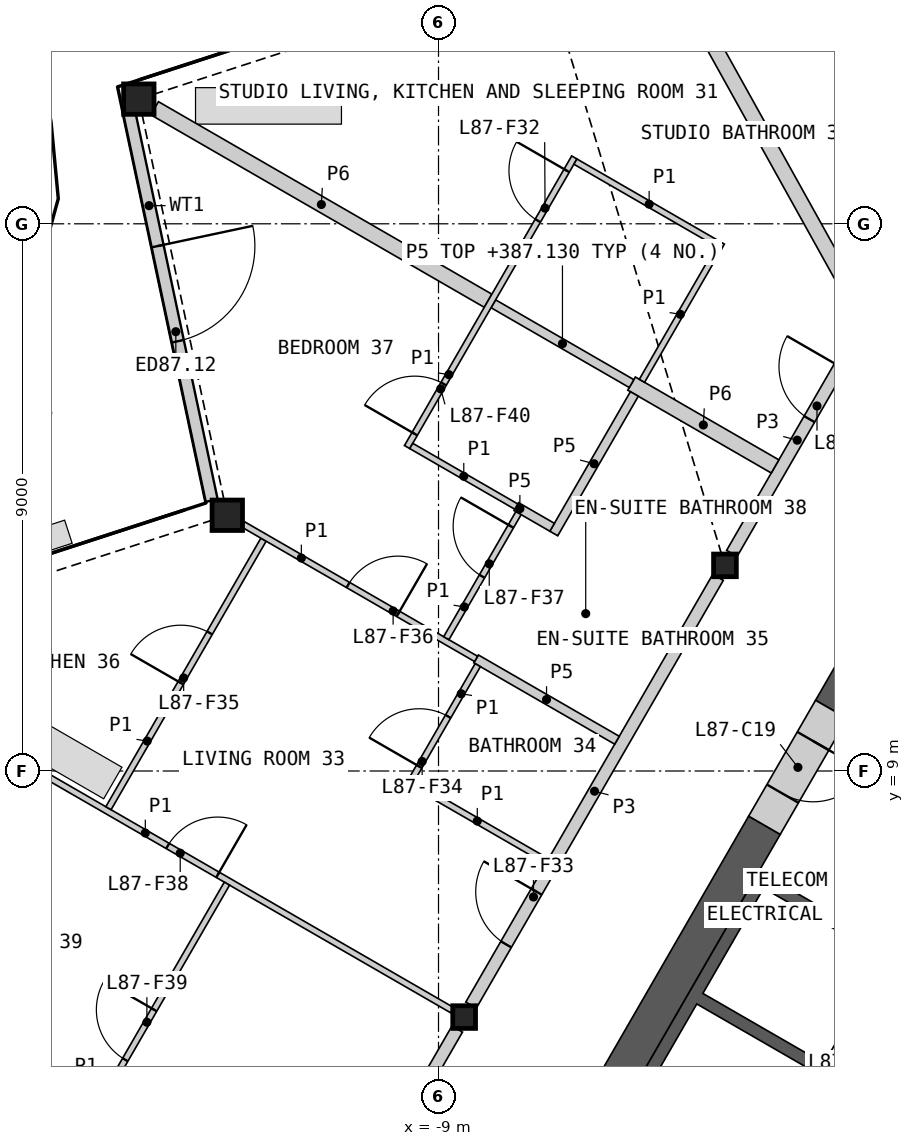
"""IFC4 building model, lengths in metres.
Left out: names, types, materials, properties, quantities, classifications, styles, units other than length and angle.
Written with IfcOpenShell. Run it as: python <this file> out.ifc"""

import sys

from ifc_helpers import new_model, si_unit, direction, frame, frame_2d, origin, origin_2d, place, context, subcontext, project, spatial, polyline, rectangle, hollow_rectangle, i_section, outline, extrude, element, fill, save


model = new_model("IFC4")
c1 = context("Model", 3, precision=1e-05, world=origin(), true_north=direction((0.0, 1.0)))
c2 = subcontext(c1, "Body", "Model", "MODEL_VIEW")
j1 = project(units=[si_unit("LENGTHUNIT", "METRE"), si_unit("PLANEANGLEUNIT", "RADIAN")], contexts=[c1])
p1 = place(None, origin())
s1 = spatial("IfcSite", under=j1, at=p1, CompositionType="ELEMENT")
p2 = place(p1, origin())
s2 = spatial("IfcBuilding", under=s1, at=p2, CompositionType="ELEMENT")
p3 = place(p2, frame((0.0, 0.0, 384.8)))
s3 = spatial("IfcBuildingStorey", under=s2, at=p3, CompositionType="ELEMENT", Elevation=384.8)
for number, where, z_axis, x_axis in (
    (1, (-13.929, 20.051, 0.0), (0.0, 0.0, 1.0), (1.0, 0.0, 0.0)),
    (2, (-12.474, 13.206, 0.0), (0.0, 0.0, 1.0), (1.0, 0.0, 0.0)),
):
    element("IfcColumn", number, at=place(p3, frame(where, z_axis=z_axis, x_axis=x_axis)), inside=s3, PredefinedType="COLUMN", context=c2, shape_type="SweptSolid", body=[
        extrude(hollow_rectangle(XDim=0.5, YDim=0.5, WallThickness=0.03, at=origin_2d()), origin(), (0.0, 0.0, 1.0), 3.4),
    ])
for number, where, z_axis, x_axis in (
    (3, (-4.289, 12.382, 0.0), (0.0, 0.0, 1.0), (1.0, 0.0, 0.0)),
    (4, (-8.578, 4.953, 0.0), (0.0, 0.0, 1.0), (1.0, 0.0, 0.0)),
):
    element("IfcColumn", number, at=place(p3, frame(where, z_axis=z_axis, x_axis=x_axis)), inside=s3, PredefinedType="COLUMN", context=c2, shape_type="SweptSolid", body=[
        extrude(i_section(OverallWidth=0.374, OverallDepth=0.372, WebThickness=0.016, FlangeThickness=0.026, at=origin_2d()), origin(), (0.0, 0.0, 1.0), 3.4),
    ])
p4 = place(p3, frame((-14.104, 19.915, 0.0), z_axis=(0.0, 0.0, 1.0), x_axis=(0.207924998532, -0.978144771997, 0.0)))
e5 = element("IfcWall", 5, at=p4, inside=s3, PredefinedType="SOLIDWALL", context=c2, shape_type="SweptSolid", body=[
    extrude(rectangle(XDim=6.612, YDim=0.2, at=frame_2d((3.306, 0.0))), origin(), (0.0, 0.0, 1.0), 2.634),
])
p5 = place(p4, frame((2.333, 0.0, 0.0)))
e6 = element("IfcOpeningElement", 6, at=p5, cuts=e5, PredefinedType="OPENING", context=c2, shape_type="SweptSolid", body=[
    extrude(rectangle(XDim=1.6, YDim=2.25, at=frame_2d((0.8, 1.125))), frame((0.0, 0.11, 0.0), z_axis=(0.0, -1.0, 0.0), x_axis=(1.0, 0.0, 0.0)), (0.0, 0.0, 1.0), 0.22),
])
p6 = place(p3, origin())
e7 = element("IfcWall", 7, at=p6, inside=s3, PredefinedType="SHEAR", context=c2, shape_type="SweptSolid", body=[
    extrude(outline(polyline([(-4.96, 0.208), (-7.131, 1.461), (-3.731, 7.35), (-1.561, 6.097), (-1.66, 5.924), (-3.652, 7.074), (-4.652, 5.342), (-2.66, 4.192), (-2.76, 4.019), (-4.752, 5.169), (-6.852, 1.531), (-4.861, 0.381), (-4.96, 0.208)])), origin(), (0.0, 0.0, 1.0), 3.1),
])
p7 = place(p3, frame((-1.631, 5.776, 0.0), z_axis=(0.0, 0.0, 1.0), x_axis=(-0.499992876559, -0.866029516466, 0.0)))
e8 = element("IfcWall", 8, at=p7, inside=s3, PredefinedType="SOLIDWALL", context=c2, shape_type="SweptSolid", body=[
    extrude(rectangle(XDim=6.486, YDim=0.2, at=frame_2d((3.243, 0.0))), origin(), (0.0, 0.0, 1.0), 3.1),
])
p8 = place(p7, frame((0.437, 0.0, 0.0)))
e9 = element("IfcOpeningElement", 9, at=p8, cuts=e8, PredefinedType="OPENING", context=c2, shape_type="SweptSolid", body=[
    extrude(rectangle(XDim=0.9, YDim=2.1, at=frame_2d((0.45, 1.05))), frame((0.0, 0.11, 0.0), z_axis=(0.0, -1.0, 0.0), x_axis=(1.0, 0.0, 0.0)), (0.0, 0.0, 1.0), 0.22),
])
p9 = place(p7, frame((3.737, 0.0, 0.0)))
e10 = element("IfcOpeningElement", 10, at=p9, cuts=e8, PredefinedType="OPENING", context=c2, shape_type="SweptSolid", body=[
    extrude(rectangle(XDim=0.9, YDim=2.1, at=frame_2d((0.45, 1.05))), frame((0.0, 0.11, 0.0), z_axis=(0.0, -1.0, 0.0), x_axis=(1.0, 0.0, 0.0)), (0.0, 0.0, 1.0), 0.22),
])
p10 = place(p3, frame((-3.639, 8.107, 0.0), z_axis=(0.0, 0.0, 1.0), x_axis=(-0.49999180351, -0.866030135978, 0.0)))
e11 = element("IfcWall", 11, at=p10, inside=s3, PredefinedType="SHEAR", context=c2, shape_type="SweptSolid", body=[
    extrude(rectangle(XDim=7.401, YDim=0.6, at=frame_2d((3.701, 0.0))), origin(), (0.0, 0.0, 1.0), 3.1),
])
p11 = place(p3, frame((-0.26, 13.961, 0.0), z_axis=(0.0, 0.0, 1.0), x_axis=(-0.499980485389, -0.866036670257, 0.0)))
e12 = element("IfcWall", 12, at=p11, inside=s3, PredefinedType="SHEAR", context=c2, shape_type="SweptSolid", body=[
    extrude(rectangle(XDim=4.559, YDim=0.6, at=frame_2d((2.28, 0.0))), origin(), (0.0, 0.0, 1.0), 3.1),
])
p12 = place(p3, frame((-2.539, 10.013, 0.0), z_axis=(0.0, 0.0, 1.0), x_axis=(-0.50002983664, -0.866008176907, 0.0)))
e13 = element("IfcWall", 13, at=p12, inside=s3, PredefinedType="SHEAR", context=c2, shape_type="SweptSolid", body=[
    extrude(rectangle(XDim=2.2, YDim=0.6, at=frame_2d((1.1, 0.0))), origin(), (0.0, 0.0, 1.0), 3.1),
])
p13 = place(p12, frame((0.6, 0.0, 0.0)))
e14 = element("IfcOpeningElement", 14, at=p13, cuts=e13, PredefinedType="OPENING", context=c2, shape_type="SweptSolid", body=[
    extrude(rectangle(XDim=1.0, YDim=2.1, at=frame_2d((0.5, 1.05))), frame((0.0, 0.31, 0.0), z_axis=(0.0, -1.0, 0.0), x_axis=(1.0, 0.0, 0.0)), (0.0, 0.0, 1.0), 0.62),
])
p14 = place(p3, frame((-8.685, 28.499, 0.0), z_axis=(0.0, 0.0, 1.0), x_axis=(0.486017177904, -0.873949256412, 0.0)))
e15 = element("IfcWall", 15, at=p14, inside=s3, PredefinedType="PARTITIONING", context=c2, shape_type="SweptSolid", body=[
    extrude(rectangle(XDim=13.956, YDim=0.25, at=frame_2d((6.978, 0.0))), origin(), (0.0, 0.0, 1.0), 2.33),
])
p15 = place(p3, frame((-8.465, 5.15, 0.0), z_axis=(0.0, 0.0, 1.0), x_axis=(0.499992155518, 0.866029932751, 0.0)))
e16 = element("IfcWall", 16, at=p15, inside=s3, PredefinedType="PARTITIONING", context=c2, shape_type="SweptSolid", body=[
    extrude(rectangle(XDim=8.123, YDim=0.2, at=frame_2d((4.062, 0.0))), origin(), (0.0, 0.0, 1.0), 3.1),
])
p16 = place(p15, frame((1.153, 0.0, 0.0)))
e17 = element("IfcOpeningElement", 17, at=p16, cuts=e16, PredefinedType="OPENING", context=c2, shape_type="SweptSolid", body=[
    extrude(rectangle(XDim=1.0, YDim=2.1, at=frame_2d((0.5, 1.05))), frame((0.0, 0.11, 0.0), z_axis=(0.0, -1.0, 0.0), x_axis=(1.0, 0.0, 0.0)), (0.0, 0.0, 1.0), 0.22),
])
p17 = place(p3, frame((-12.754, -2.279, 0.0), z_axis=(0.0, 0.0, 1.0), x_axis=(0.500001682468, 0.866024432409, 0.0)))
e18 = element("IfcWall", 18, at=p17, inside=s3, PredefinedType="PARTITIONING", context=c2, shape_type="SweptSolid", body=[
    extrude(rectangle(XDim=8.124, YDim=0.2, at=frame_2d((4.062, 0.0))), origin(), (0.0, 0.0, 1.0), 3.1),
])
p18 = place(p17, frame((1.153, 0.0, 0.0)))
e19 = element("IfcOpeningElement", 19, at=p18, cuts=e18, PredefinedType="OPENING", context=c2, shape_type="SweptSolid", body=[
    extrude(rectangle(XDim=1.0, YDim=2.1, at=frame_2d((0.5, 1.05))), frame((0.0, 0.11, 0.0), z_axis=(0.0, -1.0, 0.0), x_axis=(1.0, 0.0, 0.0)), (0.0, 0.0, 1.0), 0.22),
])
p19 = place(p3, frame((-17.414, 4.049, 0.0), z_axis=(0.0, 0.0, 1.0), x_axis=(0.866033839264, -0.499985389037, 0.0)))
e20 = element("IfcWall", 20, at=p19, inside=s3, PredefinedType="PARTITIONING", context=c2, shape_type="SweptSolid", body=[
    extrude(rectangle(XDim=7.1, YDim=0.25, at=frame_2d((3.55, 0.0))), origin(), (0.0, 0.0, 1.0), 2.33),
])
p20 = place(p3, frame((-13.669, 19.9, 0.0), z_axis=(0.0, 0.0, 1.0), x_axis=(0.866032778651, -0.499987226139, 0.0)))
e21 = element("IfcWall", 21, at=p20, inside=s3, PredefinedType="PARTITIONING", context=c2, shape_type="SweptSolid", body=[
    extrude(rectangle(XDim=6.332, YDim=0.25, at=frame_2d((3.166, 0.0))), origin(), (0.0, 0.0, 1.0), 2.33),
])
p21 = place(p3, frame((-4.176, 12.579, 0.0), z_axis=(0.0, 0.0, 1.0), x_axis=(0.500004215162, 0.866022970146, 0.0)))
e22 = element("IfcWall", 22, at=p21, inside=s3, PredefinedType="PARTITIONING", context=c2, shape_type="SweptSolid", body=[
    extrude(rectangle(XDim=4.3, YDim=0.2, at=frame_2d((2.15, 0.0))), origin(), (0.0, 0.0, 1.0), 3.1),
])
p22 = place(p21, frame((2.55, 0.0, 0.0)))
e23 = element("IfcOpeningElement", 23, at=p22, cuts=e22, PredefinedType="OPENING", context=c2, shape_type="SweptSolid", body=[
    extrude(rectangle(XDim=1.0, YDim=2.1, at=frame_2d((0.5, 1.05))), frame((0.0, 0.11, 0.0), z_axis=(0.0, -1.0, 0.0), x_axis=(1.0, 0.0, 0.0)), (0.0, 0.0, 1.0), 0.22),
])
p23 = place(p3, frame((-5.825, 15.372, 0.0), z_axis=(0.0, 0.0, 1.0), x_axis=(0.866051307416, -0.49995513091, 0.0)))
e24 = element("IfcWall", 24, at=p23, inside=s3, PredefinedType="PARTITIONING", context=c2, shape_type="SweptSolid", body=[
    extrude(rectangle(XDim=2.725, YDim=0.25, at=frame_2d((1.362, 0.0))), origin(), (0.0, 0.0, 1.0), 2.33),
])
p24 = place(p3, frame((-8.098, 16.684, 0.0), z_axis=(0.0, 0.0, 1.0), x_axis=(0.866036909293, -0.499980071345, 0.0)))
e25 = element("IfcWall", 25, at=p24, inside=s3, PredefinedType="PLUMBINGWALL", context=c2, shape_type="SweptSolid", body=[
    extrude(rectangle(XDim=2.625, YDim=0.15, at=frame_2d((1.312, 0.0))), origin(), (0.0, 0.0, 1.0), 2.33),
])
p25 = place(p3, frame((-8.382, 10.844, 0.0), z_axis=(0.0, 0.0, 1.0), x_axis=(0.866021425885, -0.500006889861, 0.0)))
e26 = element("IfcWall", 26, at=p25, inside=s3, PredefinedType="PLUMBINGWALL", context=c2, shape_type="SweptSolid", body=[
    extrude(rectangle(XDim=2.675, YDim=0.15, at=frame_2d((1.337, 0.0))), origin(), (0.0, 0.0, 1.0), 2.33),
])
p26 = place(p3, frame((-7.104, 12.906, 0.0), z_axis=(0.0, 0.0, 1.0), x_axis=(0.499993606316, 0.866029095148, 0.0)))
e27 = element("IfcWall", 27, at=p26, inside=s3, PredefinedType="PLUMBINGWALL", context=c2, shape_type="SweptSolid", body=[
    extrude(rectangle(XDim=2.65, YDim=0.15, at=frame_2d((1.325, 0.0))), origin(), (0.0, 0.0, 1.0), 2.33),
])
p27 = place(p3, frame((-7.72, 13.349, 0.0), z_axis=(0.0, 0.0, 1.0), x_axis=(0.866113839764, -0.499846793097, 0.0)))
e28 = element("IfcWall", 28, at=p27, inside=s3, PredefinedType="PLUMBINGWALL", context=c2, shape_type="SweptSolid", body=[
    extrude(rectangle(XDim=0.68, YDim=0.15, at=frame_2d((0.34, 0.0))), origin(), (0.0, 0.0, 1.0), 2.33),
])
p28 = place(p3, frame((-18.869, 10.894, 0.0), z_axis=(0.0, 0.0, 1.0), x_axis=(0.866023724155, -0.500002909193, 0.0)))
e29 = element("IfcWall", 29, at=p28, inside=s3, PredefinedType="PARTITIONING", context=c2, shape_type="SweptSolid", body=[
    extrude(rectangle(XDim=11.655, YDim=0.1, at=frame_2d((5.827, 0.0))), origin(), (0.0, 0.0, 1.0), 2.33),
])
p29 = place(p28, frame((6.253, 0.0, 0.0)))
e30 = element("IfcOpeningElement", 30, at=p29, cuts=e29, PredefinedType="OPENING", context=c2, shape_type="SweptSolid", body=[
    extrude(rectangle(XDim=0.95, YDim=2.1, at=frame_2d((0.475, 1.05))), frame((0.0, 0.06, 0.0), z_axis=(0.0, -1.0, 0.0), x_axis=(1.0, 0.0, 0.0)), (0.0, 0.0, 1.0), 0.12),
])
p30 = place(p3, frame((-9.517, 14.328, 0.0), z_axis=(0.0, 0.0, 1.0), x_axis=(0.499996545922, 0.866027397988, 0.0)))
e31 = element("IfcWall", 31, at=p30, inside=s3, PredefinedType="PARTITIONING", context=c2, shape_type="SweptSolid", body=[
    extrude(rectangle(XDim=5.5, YDim=0.1, at=frame_2d((2.75, 0.0))), origin(), (0.0, 0.0, 1.0), 2.33),
])
p31 = place(p30, frame((4.3, 0.0, 0.0)))
e32 = element("IfcOpeningElement", 32, at=p31, cuts=e31, PredefinedType="OPENING", context=c2, shape_type="SweptSolid", body=[
    extrude(rectangle(XDim=0.95, YDim=2.1, at=frame_2d((0.475, 1.05))), frame((0.0, 0.06, 0.0), z_axis=(0.0, -1.0, 0.0), x_axis=(1.0, 0.0, 0.0)), (0.0, 0.0, 1.0), 0.12),
])
p32 = place(p30, frame((0.25, 0.0, 0.0)))
e33 = element("IfcOpeningElement", 33, at=p32, cuts=e31, PredefinedType="OPENING", context=c2, shape_type="SweptSolid", body=[
    extrude(rectangle(XDim=0.95, YDim=2.1, at=frame_2d((0.475, 1.05))), frame((0.0, 0.06, 0.0), z_axis=(0.0, -1.0, 0.0), x_axis=(1.0, 0.0, 0.0)), (0.0, 0.0, 1.0), 0.12),
])
p33 = place(p3, frame((-14.992, 2.796, 0.0), z_axis=(0.0, 0.0, 1.0), x_axis=(0.499990214365, 0.86603105345, 0.0)))
e34 = element("IfcWall", 34, at=p33, inside=s3, PredefinedType="PARTITIONING", context=c2, shape_type="SweptSolid", body=[
    extrude(rectangle(XDim=5.025, YDim=0.1, at=frame_2d((2.512, 0.0))), origin(), (0.0, 0.0, 1.0), 2.33),
])
p34 = place(p33, frame((1.68, 0.0, 0.0)))
e35 = element("IfcOpeningElement", 35, at=p34, cuts=e34, PredefinedType="OPENING", context=c2, shape_type="SweptSolid", body=[
    extrude(rectangle(XDim=0.95, YDim=2.1, at=frame_2d((0.475, 1.05))), frame((0.0, 0.06, 0.0), z_axis=(0.0, -1.0, 0.0), x_axis=(1.0, 0.0, 0.0)), (0.0, 0.0, 1.0), 0.12),
])
p35 = place(p3, frame((-14.428, 8.388, 0.0), z_axis=(0.0, 0.0, 1.0), x_axis=(0.500005610874, 0.86602216432, 0.0)))
e36 = element("IfcWall", 36, at=p35, inside=s3, PredefinedType="PARTITIONING", context=c2, shape_type="SweptSolid", body=[
    extrude(rectangle(XDim=5.1, YDim=0.1, at=frame_2d((2.55, 0.0))), origin(), (0.0, 0.0, 1.0), 2.33),
])
p36 = place(p35, frame((2.379, 0.0, 0.0)))
e37 = element("IfcOpeningElement", 37, at=p36, cuts=e36, PredefinedType="OPENING", context=c2, shape_type="SweptSolid", body=[
    extrude(rectangle(XDim=0.95, YDim=2.1, at=frame_2d((0.475, 1.05))), frame((0.0, 0.06, 0.0), z_axis=(0.0, -1.0, 0.0), x_axis=(1.0, 0.0, 0.0)), (0.0, 0.0, 1.0), 0.12),
])
p37 = place(p3, frame((-12.214, 13.056, 0.0), z_axis=(0.0, 0.0, 1.0), x_axis=(0.866017452598, -0.500013771606, 0.0)))
e38 = element("IfcWall", 38, at=p37, inside=s3, PredefinedType="PARTITIONING", context=c2, shape_type="SweptSolid", body=[
    extrude(rectangle(XDim=4.425, YDim=0.1, at=frame_2d((2.213, 0.0))), origin(), (0.0, 0.0, 1.0), 2.33),
])
p38 = place(p37, frame((1.994, 0.0, 0.0)))
e39 = element("IfcOpeningElement", 39, at=p38, cuts=e38, PredefinedType="OPENING", context=c2, shape_type="SweptSolid", body=[
    extrude(rectangle(XDim=0.95, YDim=2.1, at=frame_2d((0.475, 1.05))), frame((0.0, 0.06, 0.0), z_axis=(0.0, -1.0, 0.0), x_axis=(1.0, 0.0, 0.0)), (0.0, 0.0, 1.0), 0.12),
])
p39 = place(p3, frame((-6.748, 19.023, 0.0), z_axis=(0.0, 0.0, 1.0), x_axis=(0.866034573852, -0.49998411664, 0.0)))
e40 = element("IfcWall", 40, at=p39, inside=s3, PredefinedType="PARTITIONING", context=c2, shape_type="SweptSolid", body=[
    extrude(rectangle(XDim=2.8, YDim=0.1, at=frame_2d((1.4, 0.0))), origin(), (0.0, 0.0, 1.0), 2.33),
])
p40 = place(p3, frame((-5.654, 15.418, 0.0), z_axis=(0.0, 0.0, 1.0), x_axis=(0.500048846702, 0.865997200291, 0.0)))
e41 = element("IfcWall", 41, at=p40, inside=s3, PredefinedType="PARTITIONING", context=c2, shape_type="SweptSolid", body=[
    extrude(rectangle(XDim=2.525, YDim=0.1, at=frame_2d((1.263, 0.0))), origin(), (0.0, 0.0, 1.0), 2.33),
])
p41 = place(p3, frame((-9.51, 8.839, 0.0), z_axis=(0.0, 0.0, 1.0), x_axis=(0.866029095148, -0.499993606316, 0.0)))
e42 = element("IfcWall", 42, at=p41, inside=s3, PredefinedType="PARTITIONING", context=c2, shape_type="SweptSolid", body=[
    extrude(rectangle(XDim=2.65, YDim=0.1, at=frame_2d((1.325, 0.0))), origin(), (0.0, 0.0, 1.0), 2.33),
])
p42 = place(p3, frame((-8.872, 11.184, 0.0), z_axis=(0.0, 0.0, 1.0), x_axis=(0.499986429846, 0.866033238375, 0.0)))
e43 = element("IfcWall", 43, at=p42, inside=s3, PredefinedType="PARTITIONING", context=c2, shape_type="SweptSolid", body=[
    extrude(rectangle(XDim=2.375, YDim=0.1, at=frame_2d((1.188, 0.0))), origin(), (0.0, 0.0, 1.0), 2.33),
])
p43 = place(p42, frame((1.175, 0.0, 0.0)))
e44 = element("IfcOpeningElement", 44, at=p43, cuts=e43, PredefinedType="OPENING", context=c2, shape_type="SweptSolid", body=[
    extrude(rectangle(XDim=0.95, YDim=2.1, at=frame_2d((0.475, 1.05))), frame((0.0, 0.06, 0.0), z_axis=(0.0, -1.0, 0.0), x_axis=(1.0, 0.0, 0.0)), (0.0, 0.0, 1.0), 0.12),
])
p44 = place(p3, frame((-9.442, 8.858, 0.0), z_axis=(0.0, 0.0, 1.0), x_axis=(0.499978335414, 0.866037911478, 0.0)))
e45 = element("IfcWall", 45, at=p44, inside=s3, PredefinedType="PARTITIONING", context=c2, shape_type="SweptSolid", body=[
    extrude(rectangle(XDim=2.175, YDim=0.1, at=frame_2d((1.087, 0.0))), origin(), (0.0, 0.0, 1.0), 2.33),
])
p45 = place(p44, frame((0.25, 0.0, 0.0)))
e46 = element("IfcOpeningElement", 46, at=p45, cuts=e45, PredefinedType="OPENING", context=c2, shape_type="SweptSolid", body=[
    extrude(rectangle(XDim=0.95, YDim=2.1, at=frame_2d((0.475, 1.05))), frame((0.0, 0.06, 0.0), z_axis=(0.0, -1.0, 0.0), x_axis=(1.0, 0.0, 0.0)), (0.0, 0.0, 1.0), 0.12),
])
p46 = place(p3, frame((-9.448, 14.346, 0.0), z_axis=(0.0, 0.0, 1.0), x_axis=(0.866020521143, -0.500008456887, 0.0)))
e47 = element("IfcWall", 47, at=p46, inside=s3, PredefinedType="PARTITIONING", context=c2, shape_type="SweptSolid", body=[
    extrude(rectangle(XDim=1.995, YDim=0.1, at=frame_2d((0.998, 0.0))), origin(), (0.0, 0.0, 1.0), 2.33),
])
p47 = place(p5, origin())
e48 = element("IfcDoor", 48, at=p47, inside=s3, OperationType="DOUBLE_DOOR_SINGLE_SWING", PredefinedType="DOOR", context=c2, shape_type="SweptSolid", body=[
    extrude(rectangle(XDim=1.6, YDim=2.25, at=frame_2d((0.8, 1.125))), frame((0.0, 0.025, 0.0), z_axis=(0.0, -1.0, 0.0), x_axis=(1.0, 0.0, 0.0)), (0.0, 0.0, 1.0), 0.05),
])
fill(e6, e48)
p48 = place(p13, origin())
e49 = element("IfcDoor", 49, at=p48, inside=s3, OperationType="SINGLE_SWING_LEFT", PredefinedType="DOOR", context=c2, shape_type="SweptSolid", body=[
    extrude(rectangle(XDim=1.0, YDim=2.1, at=frame_2d((0.5, 1.05))), frame((0.0, 0.055, 0.0), z_axis=(0.0, -1.0, 0.0), x_axis=(1.0, 0.0, 0.0)), (0.0, 0.0, 1.0), 0.05),
])
fill(e14, e49)
p49 = place(p22, origin())
e50 = element("IfcDoor", 50, at=p49, inside=s3, OperationType="SINGLE_SWING_RIGHT", PredefinedType="DOOR", context=c2, shape_type="SweptSolid", body=[
    extrude(rectangle(XDim=1.0, YDim=2.1, at=frame_2d((0.5, 1.05))), frame((0.0, 0.025, 0.0), z_axis=(0.0, -1.0, 0.0), x_axis=(1.0, 0.0, 0.0)), (0.0, 0.0, 1.0), 0.05),
])
fill(e23, e50)
p50 = place(p31, origin())
e51 = element("IfcDoor", 51, at=p50, inside=s3, OperationType="SINGLE_SWING_RIGHT", PredefinedType="DOOR", context=c2, shape_type="SweptSolid", body=[
    extrude(rectangle(XDim=0.95, YDim=2.1, at=frame_2d((0.475, 1.05))), frame((0.0, 0.025, 0.0), z_axis=(0.0, -1.0, 0.0), x_axis=(1.0, 0.0, 0.0)), (0.0, 0.0, 1.0), 0.05),
])
fill(e32, e51)
p51 = place(p16, origin())
e52 = element("IfcDoor", 52, at=p51, inside=s3, OperationType="SINGLE_SWING_RIGHT", PredefinedType="DOOR", context=c2, shape_type="SweptSolid", body=[
    extrude(rectangle(XDim=1.0, YDim=2.1, at=frame_2d((0.5, 1.05))), frame((0.0, 0.025, 0.0), z_axis=(0.0, -1.0, 0.0), x_axis=(1.0, 0.0, 0.0)), (0.0, 0.0, 1.0), 0.05),
])
fill(e17, e52)
p52 = place(p45, origin())
e53 = element("IfcDoor", 53, at=p52, inside=s3, OperationType="SINGLE_SWING_LEFT", PredefinedType="DOOR", context=c2, shape_type="SweptSolid", body=[
    extrude(rectangle(XDim=0.95, YDim=2.1, at=frame_2d((0.475, 1.05))), frame((0.0, 0.025, 0.0), z_axis=(0.0, -1.0, 0.0), x_axis=(1.0, 0.0, 0.0)), (0.0, 0.0, 1.0), 0.05),
])
fill(e46, e53)
p53 = place(p36, origin())
e54 = element("IfcDoor", 54, at=p53, inside=s3, OperationType="SINGLE_SWING_LEFT", PredefinedType="DOOR", context=c2, shape_type="SweptSolid", body=[
    extrude(rectangle(XDim=0.95, YDim=2.1, at=frame_2d((0.475, 1.05))), frame((0.0, 0.025, 0.0), z_axis=(0.0, -1.0, 0.0), x_axis=(1.0, 0.0, 0.0)), (0.0, 0.0, 1.0), 0.05),
])
fill(e37, e54)
p54 = place(p38, origin())
e55 = element("IfcDoor", 55, at=p54, inside=s3, OperationType="SINGLE_SWING_RIGHT", PredefinedType="DOOR", context=c2, shape_type="SweptSolid", body=[
    extrude(rectangle(XDim=0.95, YDim=2.1, at=frame_2d((0.475, 1.05))), frame((0.0, 0.025, 0.0), z_axis=(0.0, -1.0, 0.0), x_axis=(1.0, 0.0, 0.0)), (0.0, 0.0, 1.0), 0.05),
])
fill(e39, e55)
p55 = place(p43, origin())
e56 = element("IfcDoor", 56, at=p55, inside=s3, OperationType="SINGLE_SWING_RIGHT", PredefinedType="DOOR", context=c2, shape_type="SweptSolid", body=[
    extrude(rectangle(XDim=0.95, YDim=2.1, at=frame_2d((0.475, 1.05))), frame((0.0, 0.025, 0.0), z_axis=(0.0, -1.0, 0.0), x_axis=(1.0, 0.0, 0.0)), (0.0, 0.0, 1.0), 0.05),
])
fill(e44, e56)
p56 = place(p29, origin())
e57 = element("IfcDoor", 57, at=p56, inside=s3, OperationType="SINGLE_SWING_RIGHT", PredefinedType="DOOR", context=c2, shape_type="SweptSolid", body=[
    extrude(rectangle(XDim=0.95, YDim=2.1, at=frame_2d((0.475, 1.05))), frame((0.0, 0.025, 0.0), z_axis=(0.0, -1.0, 0.0), x_axis=(1.0, 0.0, 0.0)), (0.0, 0.0, 1.0), 0.05),
])
fill(e30, e57)
p57 = place(p34, origin())
e58 = element("IfcDoor", 58, at=p57, inside=s3, OperationType="SINGLE_SWING_RIGHT", PredefinedType="DOOR", context=c2, shape_type="SweptSolid", body=[
    extrude(rectangle(XDim=0.95, YDim=2.1, at=frame_2d((0.475, 1.05))), frame((0.0, 0.025, 0.0), z_axis=(0.0, -1.0, 0.0), x_axis=(1.0, 0.0, 0.0)), (0.0, 0.0, 1.0), 0.05),
])
fill(e35, e58)
p58 = place(p32, origin())
e59 = element("IfcDoor", 59, at=p58, inside=s3, OperationType="SINGLE_SWING_LEFT", PredefinedType="DOOR", context=c2, shape_type="SweptSolid", body=[
    extrude(rectangle(XDim=0.95, YDim=2.1, at=frame_2d((0.475, 1.05))), frame((0.0, 0.025, 0.0), z_axis=(0.0, -1.0, 0.0), x_axis=(1.0, 0.0, 0.0)), (0.0, 0.0, 1.0), 0.05),
])
fill(e33, e59)
save(model, sys.argv[1])
